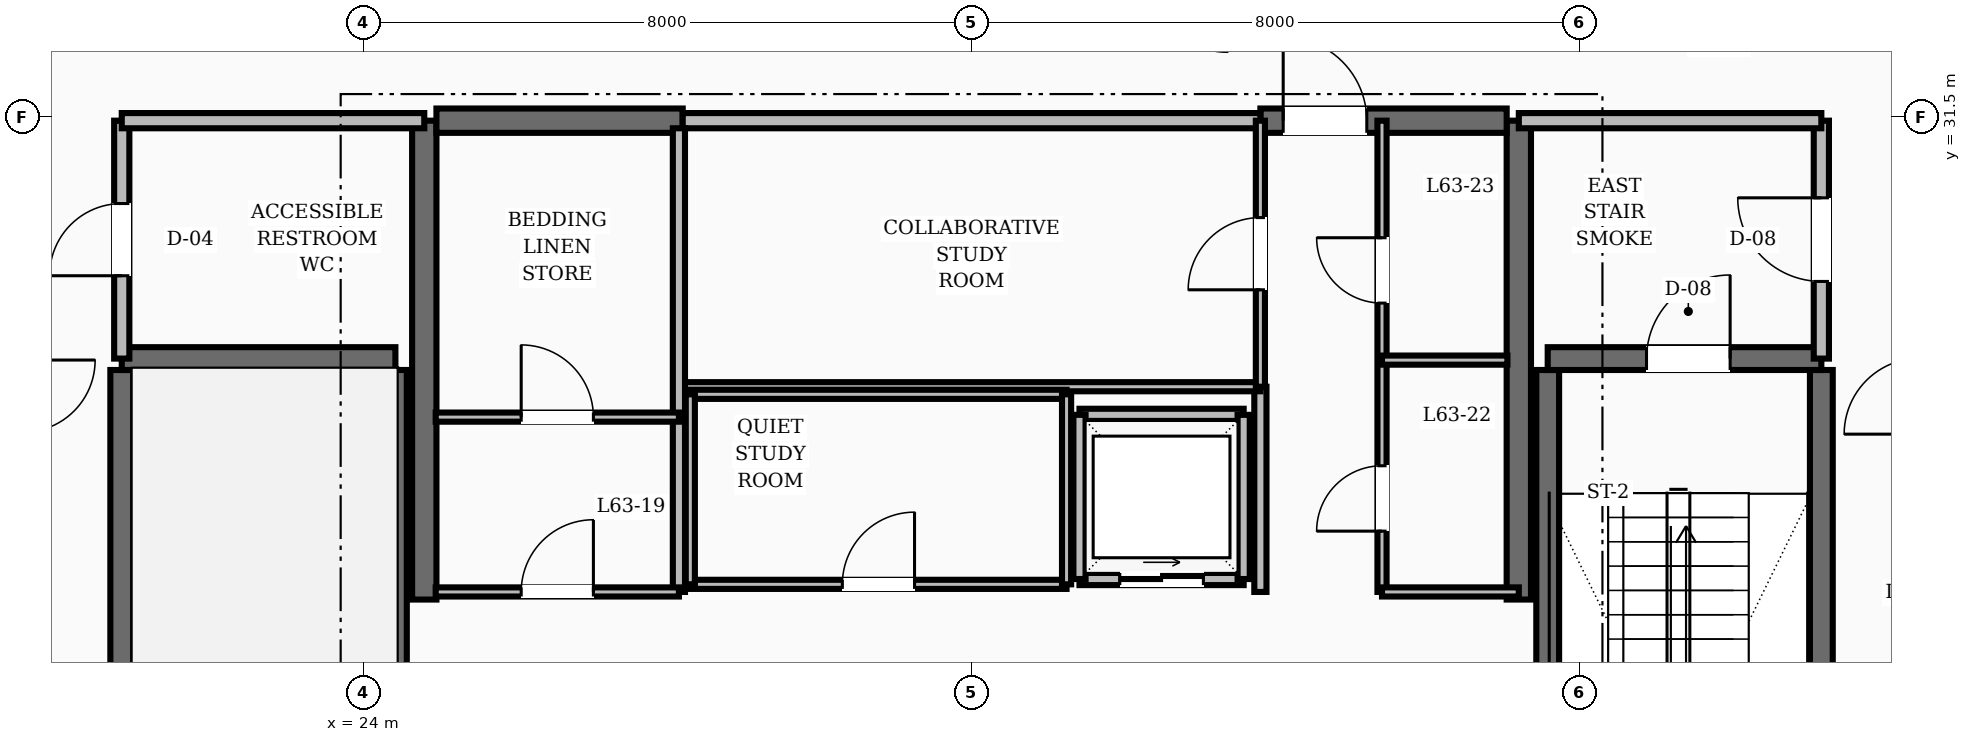
"""IFC4 building model, lengths in metres.
Left out: names, types, materials, properties, quantities, classifications, styles, units other than length and angle.
Written with IfcOpenShell. Run it as: python <this file> out.ifc"""

import sys

from ifc_helpers import new_model, si_unit, direction, frame, frame_2d, origin, place, context, subcontext, project, spatial, rectangle, extrude, element, fill, save


model = new_model("IFC4")
c1 = context("Model", 3, precision=1e-05, world=origin(), true_north=direction((0.0, 1.0)))
c2 = subcontext(c1, "Body", "Model", "MODEL_VIEW")
j1 = project(units=[si_unit("LENGTHUNIT", "METRE"), si_unit("PLANEANGLEUNIT", "RADIAN")], contexts=[c1])
p1 = place(None, origin())
s1 = spatial("IfcSite", under=j1, at=p1, CompositionType="ELEMENT")
p2 = place(p1, origin())
s2 = spatial("IfcBuilding", under=s1, at=p2, CompositionType="ELEMENT")
p3 = place(p2, frame((0.0, 0.0, 243.6)))
s3 = spatial("IfcBuildingStorey", under=s2, at=p3, CompositionType="ELEMENT", Elevation=243.6)
for number, where, z_axis, x_axis in (
    (1, (24.8, 25.15, 0.0), (0.0, 0.0, 1.0), (0.0, 1.0, 0.0)),
    (2, (39.2, 25.15, 0.0), (0.0, 0.0, 1.0), (0.0, 1.0, 0.0)),
):
    element("IfcWall", number, at=place(p3, frame(where, z_axis=z_axis, x_axis=x_axis)), inside=s3, PredefinedType="SHEAR", context=c2, shape_type="SweptSolid", body=[
        extrude(rectangle(XDim=6.3, YDim=0.32, at=frame_2d((3.15, 0.0))), origin(), (0.0, 0.0, 1.0), 3.6),
    ])
p4 = place(p3, frame((24.96, 31.45, 0.0), z_axis=(0.0, 0.0, 1.0), x_axis=(1.0, 0.0, 0.0)))
e3 = element("IfcWall", 3, at=p4, inside=s3, PredefinedType="SHEAR", context=c2, shape_type="SweptSolid", body=[
    extrude(rectangle(XDim=3.24, YDim=0.32, at=frame_2d((1.62, 0.0))), origin(), (0.0, 0.0, 1.0), 3.6),
])
p5 = place(p3, frame((35.8, 31.45, 0.0), z_axis=(0.0, 0.0, 1.0), x_axis=(1.0, 0.0, 0.0)))
e4 = element("IfcWall", 4, at=p5, inside=s3, PredefinedType="SHEAR", context=c2, shape_type="SweptSolid", body=[
    extrude(rectangle(XDim=3.24, YDim=0.32, at=frame_2d((1.62, 0.0))), origin(), (0.0, 0.0, 1.0), 3.6),
])
p6 = place(p5, frame((0.3, 0.0, 0.0)))
e5 = element("IfcOpeningElement", 5, at=p6, cuts=e4, PredefinedType="OPENING", context=c2, shape_type="SweptSolid", body=[
    extrude(rectangle(XDim=1.1, YDim=2.1, at=frame_2d((0.55, 1.05))), frame((0.0, 0.17, 0.0), z_axis=(0.0, -1.0, 0.0), x_axis=(1.0, 0.0, 0.0)), (0.0, 0.0, 1.0), 0.34),
])
for number, where, z_axis, x_axis in (
    (6, (20.82, 19.43, 0.0), (0.0, 0.0, 1.0), (0.0, 1.0, 0.0)),
    (7, (24.42, 19.43, 0.0), (0.0, 0.0, 1.0), (0.0, 1.0, 0.0)),
):
    element("IfcWall", number, at=place(p3, frame(where, z_axis=z_axis, x_axis=x_axis)), inside=s3, PredefinedType="SHEAR", context=c2, shape_type="SweptSolid", body=[
        extrude(rectangle(XDim=8.74, YDim=0.3, at=frame_2d((4.37, 0.0))), origin(), (0.0, 0.0, 1.0), 3.6),
    ])
p7 = place(p3, frame((20.82, 28.32, 0.0), z_axis=(0.0, 0.0, 1.0), x_axis=(1.0, 0.0, 0.0)))
e8 = element("IfcWall", 8, at=p7, inside=s3, PredefinedType="SHEAR", context=c2, shape_type="SweptSolid", body=[
    extrude(rectangle(XDim=3.6, YDim=0.3, at=frame_2d((1.8, 0.0))), origin(), (0.0, 0.0, 1.0), 3.6),
])
for number, where, z_axis, x_axis in (
    (9, (43.18, 19.43, 0.0), (0.0, 0.0, 1.0), (0.0, 1.0, 0.0)),
    (10, (39.58, 19.43, 0.0), (0.0, 0.0, 1.0), (0.0, 1.0, 0.0)),
):
    element("IfcWall", number, at=place(p3, frame(where, z_axis=z_axis, x_axis=x_axis)), inside=s3, PredefinedType="SHEAR", context=c2, shape_type="SweptSolid", body=[
        extrude(rectangle(XDim=8.74, YDim=0.3, at=frame_2d((4.37, 0.0))), origin(), (0.0, 0.0, 1.0), 3.6),
    ])
p8 = place(p3, frame((39.58, 28.32, 0.0), z_axis=(0.0, 0.0, 1.0), x_axis=(1.0, 0.0, 0.0)))
e11 = element("IfcWall", 11, at=p8, inside=s3, PredefinedType="SHEAR", context=c2, shape_type="SweptSolid", body=[
    extrude(rectangle(XDim=3.6, YDim=0.3, at=frame_2d((1.8, 0.0))), origin(), (0.0, 0.0, 1.0), 3.6),
])
p9 = place(p8, frame((1.3, 0.0, 0.0)))
e12 = element("IfcOpeningElement", 12, at=p9, cuts=e11, PredefinedType="OPENING", context=c2, shape_type="SweptSolid", body=[
    extrude(rectangle(XDim=1.1, YDim=2.1, at=frame_2d((0.55, 1.05))), frame((0.0, 0.16, 0.0), z_axis=(0.0, -1.0, 0.0), x_axis=(1.0, 0.0, 0.0)), (0.0, 0.0, 1.0), 0.32),
])
p10 = place(p3, frame((43.18, 28.32, 0.0), z_axis=(0.0, 0.0, 1.0), x_axis=(0.0, 1.0, 0.0)))
e13 = element("IfcWall", 13, at=p10, inside=s3, PredefinedType="SOLIDWALL", context=c2, shape_type="SweptSolid", body=[
    extrude(rectangle(XDim=3.13, YDim=0.2, at=frame_2d((1.565, 0.0))), origin(), (0.0, 0.0, 1.0), 2.87),
])
p11 = place(p10, frame((1.015, 0.0, 0.0)))
e14 = element("IfcOpeningElement", 14, at=p11, cuts=e13, PredefinedType="OPENING", context=c2, shape_type="SweptSolid", body=[
    extrude(rectangle(XDim=1.1, YDim=2.1, at=frame_2d((0.55, 1.05))), frame((0.0, 0.11, 0.0), z_axis=(0.0, -1.0, 0.0), x_axis=(1.0, 0.0, 0.0)), (0.0, 0.0, 1.0), 0.22),
])
p12 = place(p3, frame((39.2, 31.45, 0.0), z_axis=(0.0, 0.0, 1.0), x_axis=(1.0, 0.0, 0.0)))
e15 = element("IfcWall", 15, at=p12, inside=s3, PredefinedType="SOLIDWALL", context=c2, shape_type="SweptSolid", body=[
    extrude(rectangle(XDim=3.98, YDim=0.2, at=frame_2d((1.99, 0.0))), origin(), (0.0, 0.0, 1.0), 2.87),
])
p13 = place(p3, frame((20.82, 28.32, 0.0), z_axis=(0.0, 0.0, 1.0), x_axis=(0.0, 1.0, 0.0)))
e16 = element("IfcWall", 16, at=p13, inside=s3, PredefinedType="SOLIDWALL", context=c2, shape_type="SweptSolid", body=[
    extrude(rectangle(XDim=3.13, YDim=0.2, at=frame_2d((1.565, 0.0))), origin(), (0.0, 0.0, 1.0), 2.87),
])
p14 = place(p13, frame((1.09, 0.0, 0.0)))
e17 = element("IfcOpeningElement", 17, at=p14, cuts=e16, PredefinedType="OPENING", context=c2, shape_type="SweptSolid", body=[
    extrude(rectangle(XDim=0.95, YDim=2.1, at=frame_2d((0.475, 1.05))), frame((0.0, 0.11, 0.0), z_axis=(0.0, -1.0, 0.0), x_axis=(1.0, 0.0, 0.0)), (0.0, 0.0, 1.0), 0.22),
])
p15 = place(p3, frame((20.82, 31.45, 0.0), z_axis=(0.0, 0.0, 1.0), x_axis=(1.0, 0.0, 0.0)))
e18 = element("IfcWall", 18, at=p15, inside=s3, PredefinedType="SOLIDWALL", context=c2, shape_type="SweptSolid", body=[
    extrude(rectangle(XDim=3.98, YDim=0.2, at=frame_2d((1.99, 0.0))), origin(), (0.0, 0.0, 1.0), 2.87),
])
p16 = place(p3, frame((35.8, 25.25, 0.0), z_axis=(0.0, 0.0, 1.0), x_axis=(0.0, 1.0, 0.0)))
e19 = element("IfcWall", 19, at=p16, inside=s3, PredefinedType="SOLIDWALL", context=c2, shape_type="SweptSolid", body=[
    extrude(rectangle(XDim=2.7, YDim=0.16, at=frame_2d((1.35, 0.0))), origin(), (0.0, 0.0, 1.0), 2.87),
])
p17 = place(p3, frame((33.42, 25.42, 0.0), z_axis=(0.0, 0.0, 1.0), x_axis=(1.0, 0.0, 0.0)))
e20 = element("IfcWall", 20, at=p17, inside=s3, PredefinedType="SOLIDWALL", context=c2, shape_type="SweptSolid", body=[
    extrude(rectangle(XDim=2.16, YDim=0.16, at=frame_2d((1.08, 0.0))), origin(), (0.0, 0.0, 1.0), 2.87),
])
p18 = place(p17, frame((0.53, 0.0, 0.0)))
e21 = element("IfcOpeningElement", 21, at=p18, cuts=e20, PredefinedType="OPENING", context=c2, shape_type="SweptSolid", body=[
    extrude(rectangle(XDim=1.1, YDim=2.15, at=frame_2d((0.55, 1.075))), frame((0.0, 0.09, 0.0), z_axis=(0.0, -1.0, 0.0), x_axis=(1.0, 0.0, 0.0)), (0.0, 0.0, 1.0), 0.18),
])
for number, where, z_axis, x_axis in (
    (22, (33.42, 27.58, 0.0), (0.0, 0.0, 1.0), (1.0, 0.0, 0.0)),
    (23, (33.42, 25.42, 0.0), (0.0, 0.0, 1.0), (0.0, 1.0, 0.0)),
    (24, (35.58, 25.42, 0.0), (0.0, 0.0, 1.0), (0.0, 1.0, 0.0)),
):
    element("IfcWall", number, at=place(p3, frame(where, z_axis=z_axis, x_axis=x_axis)), inside=s3, PredefinedType="SOLIDWALL", context=c2, shape_type="SweptSolid", body=[
        extrude(rectangle(XDim=2.16, YDim=0.16, at=frame_2d((1.08, 0.0))), origin(), (0.0, 0.0, 1.0), 2.87),
    ])
p19 = place(p3, frame((28.2, 31.45, 0.0), z_axis=(0.0, 0.0, 1.0), x_axis=(1.0, 0.0, 0.0)))
e25 = element("IfcWall", 25, at=p19, inside=s3, PredefinedType="SOLIDWALL", context=c2, shape_type="SweptSolid", body=[
    extrude(rectangle(XDim=7.6, YDim=0.2, at=frame_2d((3.8, 0.0))), origin(), (0.0, 0.0, 1.0), 2.87),
])
p20 = place(p3, frame((28.2, 27.95, 0.0), z_axis=(0.0, 0.0, 1.0), x_axis=(1.0, 0.0, 0.0)))
e26 = element("IfcWall", 26, at=p20, inside=s3, PredefinedType="PARTITIONING", context=c2, shape_type="SweptSolid", body=[
    extrude(rectangle(XDim=7.6, YDim=0.12, at=frame_2d((3.8, 0.0))), origin(), (0.0, 0.0, 1.0), 2.87),
])
p21 = place(p3, frame((35.8, 27.95, 0.0), z_axis=(0.0, 0.0, 1.0), x_axis=(0.0, 1.0, 0.0)))
e27 = element("IfcWall", 27, at=p21, inside=s3, PredefinedType="PARTITIONING", context=c2, shape_type="SweptSolid", body=[
    extrude(rectangle(XDim=3.5, YDim=0.12, at=frame_2d((1.75, 0.0))), origin(), (0.0, 0.0, 1.0), 2.87),
])
p22 = place(p21, frame((1.275, 0.0, 0.0)))
e28 = element("IfcOpeningElement", 28, at=p22, cuts=e27, PredefinedType="OPENING", context=c2, shape_type="SweptSolid", body=[
    extrude(rectangle(XDim=0.95, YDim=2.1, at=frame_2d((0.475, 1.05))), frame((0.0, 0.07, 0.0), z_axis=(0.0, -1.0, 0.0), x_axis=(1.0, 0.0, 0.0)), (0.0, 0.0, 1.0), 0.14),
])
p23 = place(p3, frame((28.3, 25.35, 0.0), z_axis=(0.0, 0.0, 1.0), x_axis=(1.0, 0.0, 0.0)))
e29 = element("IfcWall", 29, at=p23, inside=s3, PredefinedType="PARTITIONING", context=c2, shape_type="SweptSolid", body=[
    extrude(rectangle(XDim=4.95, YDim=0.12, at=frame_2d((2.475, 0.0))), origin(), (0.0, 0.0, 1.0), 2.87),
])
p24 = place(p23, frame((2.0, 0.0, 0.0)))
e30 = element("IfcOpeningElement", 30, at=p24, cuts=e29, PredefinedType="OPENING", context=c2, shape_type="SweptSolid", body=[
    extrude(rectangle(XDim=0.95, YDim=2.1, at=frame_2d((0.475, 1.05))), frame((0.0, 0.07, 0.0), z_axis=(0.0, -1.0, 0.0), x_axis=(1.0, 0.0, 0.0)), (0.0, 0.0, 1.0), 0.14),
])
p25 = place(p3, frame((28.3, 27.85, 0.0), z_axis=(0.0, 0.0, 1.0), x_axis=(1.0, 0.0, 0.0)))
e31 = element("IfcWall", 31, at=p25, inside=s3, PredefinedType="PARTITIONING", context=c2, shape_type="SweptSolid", body=[
    extrude(rectangle(XDim=4.95, YDim=0.12, at=frame_2d((2.475, 0.0))), origin(), (0.0, 0.0, 1.0), 2.87),
])
for number, where, z_axis, x_axis in (
    (32, (28.3, 25.35, 0.0), (0.0, 0.0, 1.0), (0.0, 1.0, 0.0)),
    (33, (33.25, 25.35, 0.0), (0.0, 0.0, 1.0), (0.0, 1.0, 0.0)),
):
    element("IfcWall", number, at=place(p3, frame(where, z_axis=z_axis, x_axis=x_axis)), inside=s3, PredefinedType="PARTITIONING", context=c2, shape_type="SweptSolid", body=[
        extrude(rectangle(XDim=2.5, YDim=0.12, at=frame_2d((1.25, 0.0))), origin(), (0.0, 0.0, 1.0), 2.87),
    ])
p26 = place(p3, frame((28.15, 25.25, 0.0), z_axis=(0.0, 0.0, 1.0), x_axis=(0.0, 1.0, 0.0)))
e34 = element("IfcWall", 34, at=p26, inside=s3, PredefinedType="SOLIDWALL", context=c2, shape_type="SweptSolid", body=[
    extrude(rectangle(XDim=6.1, YDim=0.16, at=frame_2d((3.05, 0.0))), origin(), (0.0, 0.0, 1.0), 2.87),
])
p27 = place(p3, frame((24.95, 25.25, 0.0), z_axis=(0.0, 0.0, 1.0), x_axis=(1.0, 0.0, 0.0)))
e35 = element("IfcWall", 35, at=p27, inside=s3, PredefinedType="PARTITIONING", context=c2, shape_type="SweptSolid", body=[
    extrude(rectangle(XDim=3.2, YDim=0.12, at=frame_2d((1.6, 0.0))), origin(), (0.0, 0.0, 1.0), 2.87),
])
p28 = place(p27, frame((1.125, 0.0, 0.0)))
e36 = element("IfcOpeningElement", 36, at=p28, cuts=e35, PredefinedType="OPENING", context=c2, shape_type="SweptSolid", body=[
    extrude(rectangle(XDim=0.95, YDim=2.1, at=frame_2d((0.475, 1.05))), frame((0.0, 0.07, 0.0), z_axis=(0.0, -1.0, 0.0), x_axis=(1.0, 0.0, 0.0)), (0.0, 0.0, 1.0), 0.14),
])
p29 = place(p3, frame((37.4, 25.25, 0.0), z_axis=(0.0, 0.0, 1.0), x_axis=(0.0, 1.0, 0.0)))
e37 = element("IfcWall", 37, at=p29, inside=s3, PredefinedType="PARTITIONING", context=c2, shape_type="SweptSolid", body=[
    extrude(rectangle(XDim=6.2, YDim=0.12, at=frame_2d((3.1, 0.0))), origin(), (0.0, 0.0, 1.0), 2.87),
])
p30 = place(p29, frame((0.8, 0.0, 0.0)))
e38 = element("IfcOpeningElement", 38, at=p30, cuts=e37, PredefinedType="OPENING", context=c2, shape_type="SweptSolid", body=[
    extrude(rectangle(XDim=0.86, YDim=2.1, at=frame_2d((0.43, 1.05))), frame((0.0, 0.07, 0.0), z_axis=(0.0, -1.0, 0.0), x_axis=(1.0, 0.0, 0.0)), (0.0, 0.0, 1.0), 0.14),
])
p31 = place(p29, frame((3.8, 0.0, 0.0)))
e39 = element("IfcOpeningElement", 39, at=p31, cuts=e37, PredefinedType="OPENING", context=c2, shape_type="SweptSolid", body=[
    extrude(rectangle(XDim=0.86, YDim=2.1, at=frame_2d((0.43, 1.05))), frame((0.0, 0.07, 0.0), z_axis=(0.0, -1.0, 0.0), x_axis=(1.0, 0.0, 0.0)), (0.0, 0.0, 1.0), 0.14),
])
p32 = place(p3, frame((37.4, 25.25, 0.0), z_axis=(0.0, 0.0, 1.0), x_axis=(1.0, 0.0, 0.0)))
e40 = element("IfcWall", 40, at=p32, inside=s3, PredefinedType="PARTITIONING", context=c2, shape_type="SweptSolid", body=[
    extrude(rectangle(XDim=1.8, YDim=0.12, at=frame_2d((0.9, 0.0))), origin(), (0.0, 0.0, 1.0), 2.87),
])
p33 = place(p3, frame((24.95, 27.55, 0.0), z_axis=(0.0, 0.0, 1.0), x_axis=(1.0, 0.0, 0.0)))
e41 = element("IfcWall", 41, at=p33, inside=s3, PredefinedType="PARTITIONING", context=c2, shape_type="SweptSolid", body=[
    extrude(rectangle(XDim=3.2, YDim=0.12, at=frame_2d((1.6, 0.0))), origin(), (0.0, 0.0, 1.0), 2.87),
])
p34 = place(p33, frame((1.125, 0.0, 0.0)))
e42 = element("IfcOpeningElement", 42, at=p34, cuts=e41, PredefinedType="OPENING", context=c2, shape_type="SweptSolid", body=[
    extrude(rectangle(XDim=0.95, YDim=2.1, at=frame_2d((0.475, 1.05))), frame((0.0, 0.07, 0.0), z_axis=(0.0, -1.0, 0.0), x_axis=(1.0, 0.0, 0.0)), (0.0, 0.0, 1.0), 0.14),
])
p35 = place(p3, frame((37.4, 28.3, 0.0), z_axis=(0.0, 0.0, 1.0), x_axis=(1.0, 0.0, 0.0)))
e43 = element("IfcWall", 43, at=p35, inside=s3, PredefinedType="PARTITIONING", context=c2, shape_type="SweptSolid", body=[
    extrude(rectangle(XDim=1.65, YDim=0.12, at=frame_2d((0.825, 0.0))), origin(), (0.0, 0.0, 1.0), 2.87),
])
for number, where, z_axis, x_axis in (
    (44, (44.427, 32.303, 0.0), (0.0, 0.0, 1.0), (-0.707, 0.707, 0.0)),
    (45, (21.635, 34.365, 0.0), (0.0, 0.0, 1.0), (-0.707, -0.707, 0.0)),
):
    element("IfcWall", number, at=place(p3, frame(where, z_axis=z_axis, x_axis=x_axis)), inside=s3, PredefinedType="SOLIDWALL", context=c2, shape_type="SweptSolid", body=[
        extrude(rectangle(XDim=2.916, YDim=0.16, at=frame_2d((1.458, 0.0))), origin(), (0.0, 0.0, 1.0), 2.87),
    ])
p36 = place(p9, origin())
e46 = element("IfcDoor", 46, at=p36, inside=s3, OperationType="SINGLE_SWING_RIGHT", PredefinedType="DOOR", context=c2, shape_type="SweptSolid", body=[
    extrude(rectangle(XDim=1.1, YDim=2.1, at=frame_2d((0.55, 1.05))), frame((0.0, 0.025, 0.0), z_axis=(0.0, -1.0, 0.0), x_axis=(1.0, 0.0, 0.0)), (0.0, 0.0, 1.0), 0.05),
])
fill(e12, e46)
p37 = place(p11, origin())
e47 = element("IfcDoor", 47, at=p37, inside=s3, OperationType="SINGLE_SWING_RIGHT", PredefinedType="DOOR", context=c2, shape_type="SweptSolid", body=[
    extrude(rectangle(XDim=1.1, YDim=2.1, at=frame_2d((0.55, 1.05))), frame((0.0, 0.025, 0.0), z_axis=(0.0, -1.0, 0.0), x_axis=(1.0, 0.0, 0.0)), (0.0, 0.0, 1.0), 0.05),
])
fill(e14, e47)
p38 = place(p14, origin())
e48 = element("IfcDoor", 48, at=p38, inside=s3, OperationType="SINGLE_SWING_LEFT", PredefinedType="DOOR", context=c2, shape_type="SweptSolid", body=[
    extrude(rectangle(XDim=0.95, YDim=2.1, at=frame_2d((0.475, 1.05))), frame((0.0, 0.025, 0.0), z_axis=(0.0, -1.0, 0.0), x_axis=(1.0, 0.0, 0.0)), (0.0, 0.0, 1.0), 0.05),
])
fill(e17, e48)
p39 = place(p6, origin())
e49 = element("IfcDoor", 49, at=p39, inside=s3, OperationType="SINGLE_SWING_LEFT", PredefinedType="DOOR", context=c2, shape_type="SweptSolid", body=[
    extrude(rectangle(XDim=1.1, YDim=2.1, at=frame_2d((0.55, 1.05))), frame((0.0, 0.025, 0.0), z_axis=(0.0, -1.0, 0.0), x_axis=(1.0, 0.0, 0.0)), (0.0, 0.0, 1.0), 0.05),
])
fill(e5, e49)
p40 = place(p18, origin())
e50 = element("IfcDoor", 50, at=p40, inside=s3, OperationType="SLIDING_TO_RIGHT", PredefinedType="DOOR", context=c2, shape_type="SweptSolid", body=[
    extrude(rectangle(XDim=1.1, YDim=2.15, at=frame_2d((0.55, 1.075))), frame((0.0, 0.025, 0.0), z_axis=(0.0, -1.0, 0.0), x_axis=(1.0, 0.0, 0.0)), (0.0, 0.0, 1.0), 0.05),
])
fill(e21, e50)
p41 = place(p22, origin())
e51 = element("IfcDoor", 51, at=p41, inside=s3, OperationType="SINGLE_SWING_LEFT", PredefinedType="DOOR", context=c2, shape_type="SweptSolid", body=[
    extrude(rectangle(XDim=0.95, YDim=2.1, at=frame_2d((0.475, 1.05))), frame((0.0, 0.025, 0.0), z_axis=(0.0, -1.0, 0.0), x_axis=(1.0, 0.0, 0.0)), (0.0, 0.0, 1.0), 0.05),
])
fill(e28, e51)
p42 = place(p24, origin())
e52 = element("IfcDoor", 52, at=p42, inside=s3, OperationType="SINGLE_SWING_RIGHT", PredefinedType="DOOR", context=c2, shape_type="SweptSolid", body=[
    extrude(rectangle(XDim=0.95, YDim=2.1, at=frame_2d((0.475, 1.05))), frame((0.0, 0.025, 0.0), z_axis=(0.0, -1.0, 0.0), x_axis=(1.0, 0.0, 0.0)), (0.0, 0.0, 1.0), 0.05),
])
fill(e30, e52)
p43 = place(p28, origin())
e53 = element("IfcDoor", 53, at=p43, inside=s3, OperationType="SINGLE_SWING_RIGHT", PredefinedType="DOOR", context=c2, shape_type="SweptSolid", body=[
    extrude(rectangle(XDim=0.95, YDim=2.1, at=frame_2d((0.475, 1.05))), frame((0.0, 0.025, 0.0), z_axis=(0.0, -1.0, 0.0), x_axis=(1.0, 0.0, 0.0)), (0.0, 0.0, 1.0), 0.05),
])
fill(e36, e53)
p44 = place(p34, origin())
e54 = element("IfcDoor", 54, at=p44, inside=s3, OperationType="SINGLE_SWING_LEFT", PredefinedType="DOOR", context=c2, shape_type="SweptSolid", body=[
    extrude(rectangle(XDim=0.95, YDim=2.1, at=frame_2d((0.475, 1.05))), frame((0.0, 0.025, 0.0), z_axis=(0.0, -1.0, 0.0), x_axis=(1.0, 0.0, 0.0)), (0.0, 0.0, 1.0), 0.05),
])
fill(e42, e54)
p45 = place(p30, origin())
e55 = element("IfcDoor", 55, at=p45, inside=s3, OperationType="SINGLE_SWING_LEFT", PredefinedType="DOOR", context=c2, shape_type="SweptSolid", body=[
    extrude(rectangle(XDim=0.86, YDim=2.1, at=frame_2d((0.43, 1.05))), frame((0.0, 0.025, 0.0), z_axis=(0.0, -1.0, 0.0), x_axis=(1.0, 0.0, 0.0)), (0.0, 0.0, 1.0), 0.05),
])
fill(e38, e55)
p46 = place(p31, origin())
e56 = element("IfcDoor", 56, at=p46, inside=s3, OperationType="SINGLE_SWING_RIGHT", PredefinedType="DOOR", context=c2, shape_type="SweptSolid", body=[
    extrude(rectangle(XDim=0.86, YDim=2.1, at=frame_2d((0.43, 1.05))), frame((0.0, 0.025, 0.0), z_axis=(0.0, -1.0, 0.0), x_axis=(1.0, 0.0, 0.0)), (0.0, 0.0, 1.0), 0.05),
])
fill(e39, e56)
save(model, sys.argv[1])
